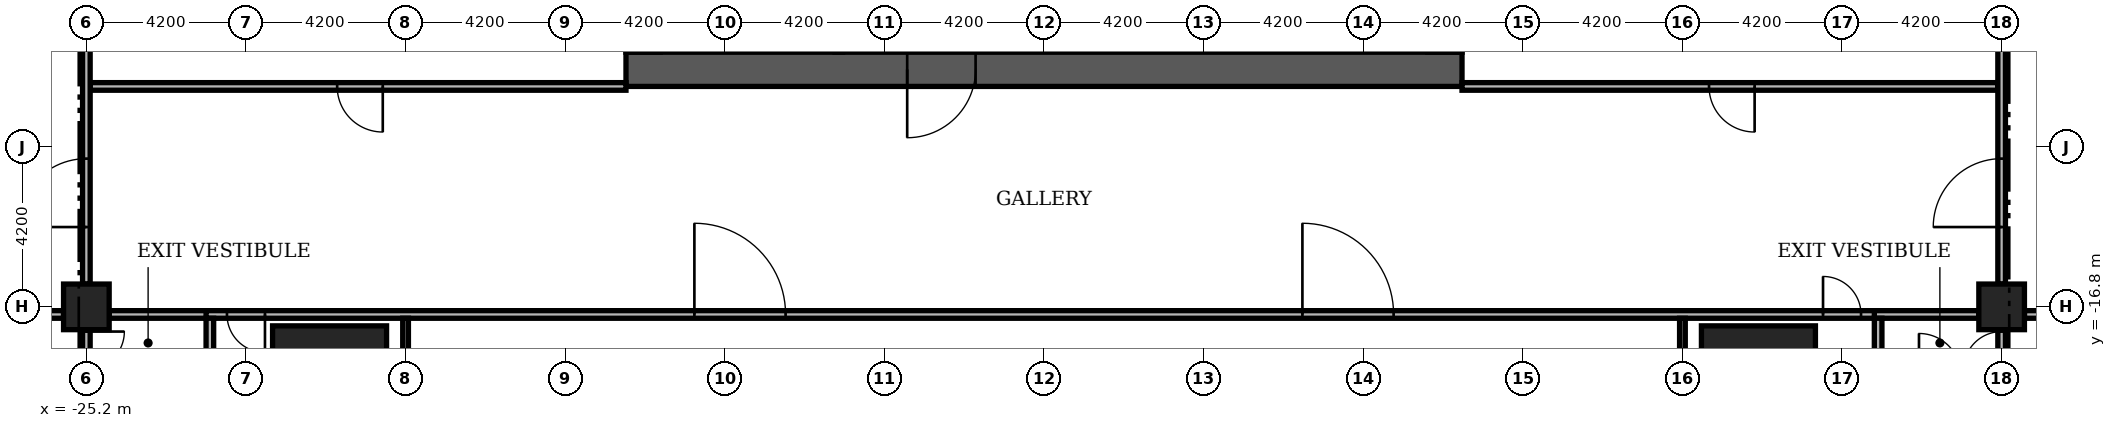
"""IFC4 building model, lengths in metres.
Left out: names, types, materials, properties, quantities, classifications, styles, units other than length and angle.
Written with IfcOpenShell. Run it as: python <this file> out.ifc"""

import sys

from ifc_helpers import new_model, si_unit, direction, frame, frame_2d, origin, origin_2d, place, context, subcontext, project, spatial, rectangle, extrude, element, fill, save


model = new_model("IFC4")
c1 = context("Model", 3, precision=1e-05, world=origin(), true_north=direction((0.0, 1.0)))
c2 = subcontext(c1, "Body", "Model", "MODEL_VIEW")
j1 = project(units=[si_unit("LENGTHUNIT", "METRE"), si_unit("PLANEANGLEUNIT", "RADIAN")], contexts=[c1])
p1 = place(None, origin())
s1 = spatial("IfcSite", under=j1, at=p1, CompositionType="ELEMENT")
p2 = place(p1, origin())
s2 = spatial("IfcBuilding", under=s1, at=p2, CompositionType="ELEMENT")
p3 = place(p2, origin())
s3 = spatial("IfcBuildingStorey", under=s2, at=p3, CompositionType="ELEMENT", Elevation=0.0)
p4 = place(p3, frame((-11.0, -10.55, 0.0), z_axis=(0.0, 0.0, 1.0), x_axis=(1.0, 0.0, 0.0)))
e1 = element("IfcWall", 1, at=p4, inside=s3, PredefinedType="SHEAR", context=c2, shape_type="SweptSolid", body=[
    extrude(rectangle(XDim=22.0, YDim=0.9, at=frame_2d((11.0, 0.0))), origin(), (0.0, 0.0, 1.0), 6.78),
])
p5 = place(p4, frame((7.4, 0.0, 0.0)))
e2 = element("IfcOpeningElement", 2, at=p5, cuts=e1, PredefinedType="OPENING", context=c2, shape_type="SweptSolid", body=[
    extrude(rectangle(XDim=1.8, YDim=2.2, at=frame_2d((0.9, 1.1))), frame((0.0, 0.46, 0.0), z_axis=(0.0, -1.0, 0.0), x_axis=(1.0, 0.0, 0.0)), (0.0, 0.0, 1.0), 0.92),
])
for number, where, z_axis, x_axis in (
    (3, (18.8, -18.8, 0.0), (0.0, 0.0, 1.0), (1.0, 0.0, 0.0)),
    (4, (-18.8, -18.8, 0.0), (0.0, 0.0, 1.0), (1.0, 0.0, 0.0)),
):
    element("IfcColumn", number, at=place(p3, frame(where, z_axis=z_axis, x_axis=x_axis)), inside=s3, PredefinedType="COLUMN", context=c2, shape_type="SweptSolid", body=[
        extrude(rectangle(XDim=3.0, YDim=3.0, at=origin_2d()), origin(), (0.0, 0.0, 1.0), 7.2),
    ])
for number, where, z_axis, x_axis in (
    (5, (25.2, -16.8, 0.0), (0.0, 0.0, 1.0), (1.0, 0.0, 0.0)),
    (6, (-25.2, -16.8, 0.0), (0.0, 0.0, 1.0), (1.0, 0.0, 0.0)),
):
    element("IfcColumn", number, at=place(p3, frame(where, z_axis=z_axis, x_axis=x_axis)), inside=s3, PredefinedType="COLUMN", context=c2, shape_type="SweptSolid", body=[
        extrude(rectangle(XDim=1.2, YDim=1.2, at=origin_2d()), origin(), (0.0, 0.0, 1.0), 7.2),
    ])
p6 = place(p3, frame((-33.0, -17.0, 0.0), z_axis=(0.0, 0.0, 1.0), x_axis=(1.0, 0.0, 0.0)))
e7 = element("IfcWall", 7, at=p6, inside=s3, PredefinedType="PARTITIONING", context=c2, shape_type="SweptSolid", body=[
    extrude(rectangle(XDim=7.2, YDim=0.2, at=frame_2d((3.6, 0.0))), origin(), (0.0, 0.0, 1.0), 6.48),
])
p7 = place(p3, frame((-24.6, -17.0, 0.0), z_axis=(0.0, 0.0, 1.0), x_axis=(1.0, 0.0, 0.0)))
e8 = element("IfcWall", 8, at=p7, inside=s3, PredefinedType="PARTITIONING", context=c2, shape_type="SweptSolid", body=[
    extrude(rectangle(XDim=2.75, YDim=0.2, at=frame_2d((1.375, 0.0))), origin(), (0.0, 0.0, 1.0), 6.78),
])
p8 = place(p3, frame((-22.05, -17.0, 0.0), z_axis=(0.0, 0.0, 1.0), x_axis=(1.0, 0.0, 0.0)))
e9 = element("IfcWall", 9, at=p8, inside=s3, PredefinedType="PARTITIONING", context=c2, shape_type="SweptSolid", body=[
    extrude(rectangle(XDim=44.1, YDim=0.2, at=frame_2d((22.05, 0.0))), origin(), (0.0, 0.0, 1.0), 6.78),
])
p9 = place(p8, frame((0.55, 0.0, 0.0)))
e10 = element("IfcOpeningElement", 10, at=p9, cuts=e9, PredefinedType="OPENING", context=c2, shape_type="SweptSolid", body=[
    extrude(rectangle(XDim=1.0, YDim=2.1, at=frame_2d((0.5, 1.05))), frame((0.0, 0.11, 0.0), z_axis=(0.0, -1.0, 0.0), x_axis=(1.0, 0.0, 0.0)), (0.0, 0.0, 1.0), 0.22),
])
p10 = place(p8, frame((12.85, 0.0, 0.0)))
e11 = element("IfcOpeningElement", 11, at=p10, cuts=e9, PredefinedType="OPENING", context=c2, shape_type="SweptSolid", body=[
    extrude(rectangle(XDim=2.4, YDim=2.4, at=frame_2d((1.2, 1.2))), frame((0.0, 0.11, 0.0), z_axis=(0.0, -1.0, 0.0), x_axis=(1.0, 0.0, 0.0)), (0.0, 0.0, 1.0), 0.22),
])
p11 = place(p8, frame((28.85, 0.0, 0.0)))
e12 = element("IfcOpeningElement", 12, at=p11, cuts=e9, PredefinedType="OPENING", context=c2, shape_type="SweptSolid", body=[
    extrude(rectangle(XDim=2.4, YDim=2.4, at=frame_2d((1.2, 1.2))), frame((0.0, 0.11, 0.0), z_axis=(0.0, -1.0, 0.0), x_axis=(1.0, 0.0, 0.0)), (0.0, 0.0, 1.0), 0.22),
])
p12 = place(p8, frame((42.55, 0.0, 0.0)))
e13 = element("IfcOpeningElement", 13, at=p12, cuts=e9, PredefinedType="OPENING", context=c2, shape_type="SweptSolid", body=[
    extrude(rectangle(XDim=1.0, YDim=2.1, at=frame_2d((0.5, 1.05))), frame((0.0, 0.11, 0.0), z_axis=(0.0, -1.0, 0.0), x_axis=(1.0, 0.0, 0.0)), (0.0, 0.0, 1.0), 0.22),
])
p13 = place(p3, frame((21.85, -17.0, 0.0), z_axis=(0.0, 0.0, 1.0), x_axis=(1.0, 0.0, 0.0)))
e14 = element("IfcWall", 14, at=p13, inside=s3, PredefinedType="PARTITIONING", context=c2, shape_type="SweptSolid", body=[
    extrude(rectangle(XDim=2.75, YDim=0.2, at=frame_2d((1.375, 0.0))), origin(), (0.0, 0.0, 1.0), 6.78),
])
p14 = place(p3, frame((25.8, -17.0, 0.0), z_axis=(0.0, 0.0, 1.0), x_axis=(1.0, 0.0, 0.0)))
e15 = element("IfcWall", 15, at=p14, inside=s3, PredefinedType="PARTITIONING", context=c2, shape_type="SweptSolid", body=[
    extrude(rectangle(XDim=7.2, YDim=0.2, at=frame_2d((3.6, 0.0))), origin(), (0.0, 0.0, 1.0), 6.48),
])
p15 = place(p3, frame((-25.1, -11.0, 0.0), z_axis=(0.0, 0.0, 1.0), x_axis=(1.0, 0.0, 0.0)))
e16 = element("IfcWall", 16, at=p15, inside=s3, PredefinedType="PARTITIONING", context=c2, shape_type="SweptSolid", body=[
    extrude(rectangle(XDim=14.1, YDim=0.2, at=frame_2d((7.05, 0.0))), origin(), (0.0, 0.0, 1.0), 6.78),
])
p16 = place(p15, frame((6.5, 0.0, 0.0)))
e17 = element("IfcOpeningElement", 17, at=p16, cuts=e16, PredefinedType="OPENING", context=c2, shape_type="SweptSolid", body=[
    extrude(rectangle(XDim=1.2, YDim=2.2, at=frame_2d((0.6, 1.1))), frame((0.0, 0.11, 0.0), z_axis=(0.0, -1.0, 0.0), x_axis=(1.0, 0.0, 0.0)), (0.0, 0.0, 1.0), 0.22),
])
p17 = place(p3, frame((11.0, -11.0, 0.0), z_axis=(0.0, 0.0, 1.0), x_axis=(1.0, 0.0, 0.0)))
e18 = element("IfcWall", 18, at=p17, inside=s3, PredefinedType="PARTITIONING", context=c2, shape_type="SweptSolid", body=[
    extrude(rectangle(XDim=14.1, YDim=0.2, at=frame_2d((7.05, 0.0))), origin(), (0.0, 0.0, 1.0), 6.78),
])
p18 = place(p17, frame((6.5, 0.0, 0.0)))
e19 = element("IfcOpeningElement", 19, at=p18, cuts=e18, PredefinedType="OPENING", context=c2, shape_type="SweptSolid", body=[
    extrude(rectangle(XDim=1.2, YDim=2.2, at=frame_2d((0.6, 1.1))), frame((0.0, 0.11, 0.0), z_axis=(0.0, -1.0, 0.0), x_axis=(1.0, 0.0, 0.0)), (0.0, 0.0, 1.0), 0.22),
])
p19 = place(p3, frame((-25.2, -18.5, 0.0), z_axis=(0.0, 0.0, 1.0), x_axis=(0.0, 1.0, 0.0)))
e20 = element("IfcWall", 20, at=p19, inside=s3, PredefinedType="PARTITIONING", context=c2, shape_type="SweptSolid", body=[
    extrude(rectangle(XDim=1.1, YDim=0.2, at=frame_2d((0.55, 0.0))), origin(), (0.0, 0.0, 1.0), 6.38),
])
p20 = place(p19, frame((0.05, 0.0, 0.0)))
e21 = element("IfcOpeningElement", 21, at=p20, cuts=e20, PredefinedType="OPENING", context=c2, shape_type="SweptSolid", body=[
    extrude(rectangle(XDim=1.0, YDim=2.2, at=frame_2d((0.5, 1.1))), frame((0.0, 0.11, 0.0), z_axis=(0.0, -1.0, 0.0), x_axis=(1.0, 0.0, 0.0)), (0.0, 0.0, 1.0), 0.22),
])
p21 = place(p3, frame((-25.2, -16.2, 0.0), z_axis=(0.0, 0.0, 1.0), x_axis=(0.0, 1.0, 0.0)))
e22 = element("IfcWall", 22, at=p21, inside=s3, PredefinedType="PARTITIONING", context=c2, shape_type="SweptSolid", body=[
    extrude(rectangle(XDim=7.2, YDim=0.2, at=frame_2d((3.6, 0.0))), origin(), (0.0, 0.0, 1.0), 6.48),
])
p22 = place(p21, frame((1.5, 0.0, 0.0)))
e23 = element("IfcOpeningElement", 23, at=p22, cuts=e22, PredefinedType="OPENING", context=c2, shape_type="SweptSolid", body=[
    extrude(rectangle(XDim=1.8, YDim=2.2, at=frame_2d((0.9, 1.1))), frame((0.0, 0.11, 0.0), z_axis=(0.0, -1.0, 0.0), x_axis=(1.0, 0.0, 0.0)), (0.0, 0.0, 1.0), 0.22),
])
p23 = place(p3, frame((-21.95, -18.5, 0.0), z_axis=(0.0, 0.0, 1.0), x_axis=(0.0, 1.0, 0.0)))
e24 = element("IfcWall", 24, at=p23, inside=s3, PredefinedType="PARTITIONING", context=c2, shape_type="SweptSolid", body=[
    extrude(rectangle(XDim=1.4, YDim=0.2, at=frame_2d((0.7, 0.0))), origin(), (0.0, 0.0, 1.0), 6.78),
])
for number, where, z_axis, x_axis in (
    (25, (-16.8, -24.6, 0.0), (0.0, 0.0, 1.0), (0.0, 1.0, 0.0)),
    (26, (16.8, -24.6, 0.0), (0.0, 0.0, 1.0), (0.0, 1.0, 0.0)),
):
    element("IfcWall", number, at=place(p3, frame(where, z_axis=z_axis, x_axis=x_axis)), inside=s3, PredefinedType="PARTITIONING", context=c2, shape_type="SweptSolid", body=[
        extrude(rectangle(XDim=7.5, YDim=0.15, at=frame_2d((3.75, 0.0))), origin(), (0.0, 0.0, 1.0), 6.78),
    ])
p24 = place(p3, frame((21.95, -18.5, 0.0), z_axis=(0.0, 0.0, 1.0), x_axis=(0.0, 1.0, 0.0)))
e27 = element("IfcWall", 27, at=p24, inside=s3, PredefinedType="PARTITIONING", context=c2, shape_type="SweptSolid", body=[
    extrude(rectangle(XDim=1.4, YDim=0.2, at=frame_2d((0.7, 0.0))), origin(), (0.0, 0.0, 1.0), 6.78),
])
p25 = place(p3, frame((25.2, -18.5, 0.0), z_axis=(0.0, 0.0, 1.0), x_axis=(0.0, 1.0, 0.0)))
e28 = element("IfcWall", 28, at=p25, inside=s3, PredefinedType="PARTITIONING", context=c2, shape_type="SweptSolid", body=[
    extrude(rectangle(XDim=1.1, YDim=0.2, at=frame_2d((0.55, 0.0))), origin(), (0.0, 0.0, 1.0), 6.38),
])
p26 = place(p25, frame((0.05, 0.0, 0.0)))
e29 = element("IfcOpeningElement", 29, at=p26, cuts=e28, PredefinedType="OPENING", context=c2, shape_type="SweptSolid", body=[
    extrude(rectangle(XDim=1.0, YDim=2.2, at=frame_2d((0.5, 1.1))), frame((0.0, 0.11, 0.0), z_axis=(0.0, -1.0, 0.0), x_axis=(1.0, 0.0, 0.0)), (0.0, 0.0, 1.0), 0.22),
])
p27 = place(p3, frame((25.2, -16.2, 0.0), z_axis=(0.0, 0.0, 1.0), x_axis=(0.0, 1.0, 0.0)))
e30 = element("IfcWall", 30, at=p27, inside=s3, PredefinedType="PARTITIONING", context=c2, shape_type="SweptSolid", body=[
    extrude(rectangle(XDim=7.2, YDim=0.2, at=frame_2d((3.6, 0.0))), origin(), (0.0, 0.0, 1.0), 6.48),
])
p28 = place(p27, frame((1.5, 0.0, 0.0)))
e31 = element("IfcOpeningElement", 31, at=p28, cuts=e30, PredefinedType="OPENING", context=c2, shape_type="SweptSolid", body=[
    extrude(rectangle(XDim=1.8, YDim=2.2, at=frame_2d((0.9, 1.1))), frame((0.0, 0.11, 0.0), z_axis=(0.0, -1.0, 0.0), x_axis=(1.0, 0.0, 0.0)), (0.0, 0.0, 1.0), 0.22),
])
p29 = place(p5, frame((1.8, 0.0, 0.0), z_axis=(0.0, 0.0, 1.0), x_axis=(-1.0, 0.0, 0.0)))
e32 = element("IfcDoor", 32, at=p29, inside=s3, OperationType="DOUBLE_DOOR_SINGLE_SWING", PredefinedType="DOOR", context=c2, shape_type="SweptSolid", body=[
    extrude(rectangle(XDim=1.8, YDim=2.2, at=frame_2d((0.9, 1.1))), frame((0.0, 0.025, 0.0), z_axis=(0.0, -1.0, 0.0), x_axis=(1.0, 0.0, 0.0)), (0.0, 0.0, 1.0), 0.05),
])
fill(e2, e32)
p30 = place(p20, origin())
e33 = element("IfcDoor", 33, at=p30, inside=s3, OperationType="SINGLE_SWING_RIGHT", PredefinedType="DOOR", context=c2, shape_type="SweptSolid", body=[
    extrude(rectangle(XDim=1.0, YDim=2.2, at=frame_2d((0.5, 1.1))), frame((0.0, 0.025, 0.0), z_axis=(0.0, -1.0, 0.0), x_axis=(1.0, 0.0, 0.0)), (0.0, 0.0, 1.0), 0.05),
])
fill(e21, e33)
p31 = place(p26, origin())
e34 = element("IfcDoor", 34, at=p31, inside=s3, OperationType="SINGLE_SWING_LEFT", PredefinedType="DOOR", context=c2, shape_type="SweptSolid", body=[
    extrude(rectangle(XDim=1.0, YDim=2.2, at=frame_2d((0.5, 1.1))), frame((0.0, 0.025, 0.0), z_axis=(0.0, -1.0, 0.0), x_axis=(1.0, 0.0, 0.0)), (0.0, 0.0, 1.0), 0.05),
])
fill(e29, e34)
p32 = place(p9, origin())
e35 = element("IfcDoor", 35, at=p32, inside=s3, OperationType="SINGLE_SWING_RIGHT", PredefinedType="DOOR", context=c2, shape_type="SweptSolid", body=[
    extrude(rectangle(XDim=1.0, YDim=2.1, at=frame_2d((0.5, 1.05))), frame((0.0, 0.025, 0.0), z_axis=(0.0, -1.0, 0.0), x_axis=(1.0, 0.0, 0.0)), (0.0, 0.0, 1.0), 0.05),
])
fill(e10, e35)
p33 = place(p10, origin())
e36 = element("IfcDoor", 36, at=p33, inside=s3, OperationType="DOUBLE_DOOR_SINGLE_SWING", PredefinedType="DOOR", context=c2, shape_type="SweptSolid", body=[
    extrude(rectangle(XDim=2.4, YDim=2.4, at=frame_2d((1.2, 1.2))), frame((0.0, 0.025, 0.0), z_axis=(0.0, -1.0, 0.0), x_axis=(1.0, 0.0, 0.0)), (0.0, 0.0, 1.0), 0.05),
])
fill(e11, e36)
p34 = place(p11, origin())
e37 = element("IfcDoor", 37, at=p34, inside=s3, OperationType="DOUBLE_DOOR_SINGLE_SWING", PredefinedType="DOOR", context=c2, shape_type="SweptSolid", body=[
    extrude(rectangle(XDim=2.4, YDim=2.4, at=frame_2d((1.2, 1.2))), frame((0.0, 0.025, 0.0), z_axis=(0.0, -1.0, 0.0), x_axis=(1.0, 0.0, 0.0)), (0.0, 0.0, 1.0), 0.05),
])
fill(e12, e37)
p35 = place(p12, origin())
e38 = element("IfcDoor", 38, at=p35, inside=s3, OperationType="SINGLE_SWING_LEFT", PredefinedType="DOOR", context=c2, shape_type="SweptSolid", body=[
    extrude(rectangle(XDim=1.0, YDim=2.1, at=frame_2d((0.5, 1.05))), frame((0.0, 0.025, 0.0), z_axis=(0.0, -1.0, 0.0), x_axis=(1.0, 0.0, 0.0)), (0.0, 0.0, 1.0), 0.05),
])
fill(e13, e38)
p36 = place(p22, origin())
e39 = element("IfcDoor", 39, at=p36, inside=s3, OperationType="DOUBLE_DOOR_SINGLE_SWING", PredefinedType="DOOR", context=c2, shape_type="SweptSolid", body=[
    extrude(rectangle(XDim=1.8, YDim=2.2, at=frame_2d((0.9, 1.1))), frame((0.0, 0.025, 0.0), z_axis=(0.0, -1.0, 0.0), x_axis=(1.0, 0.0, 0.0)), (0.0, 0.0, 1.0), 0.05),
])
fill(e23, e39)
p37 = place(p28, origin())
e40 = element("IfcDoor", 40, at=p37, inside=s3, OperationType="DOUBLE_DOOR_SINGLE_SWING", PredefinedType="DOOR", context=c2, shape_type="SweptSolid", body=[
    extrude(rectangle(XDim=1.8, YDim=2.2, at=frame_2d((0.9, 1.1))), frame((0.0, 0.025, 0.0), z_axis=(0.0, -1.0, 0.0), x_axis=(1.0, 0.0, 0.0)), (0.0, 0.0, 1.0), 0.05),
])
fill(e31, e40)
p38 = place(p16, origin())
e41 = element("IfcDoor", 41, at=p38, inside=s3, OperationType="SINGLE_SWING_RIGHT", PredefinedType="DOOR", context=c2, shape_type="SweptSolid", body=[
    extrude(rectangle(XDim=1.2, YDim=2.2, at=frame_2d((0.6, 1.1))), frame((0.0, 0.025, 0.0), z_axis=(0.0, -1.0, 0.0), x_axis=(1.0, 0.0, 0.0)), (0.0, 0.0, 1.0), 0.05),
])
fill(e17, e41)
p39 = place(p18, origin())
e42 = element("IfcDoor", 42, at=p39, inside=s3, OperationType="SINGLE_SWING_RIGHT", PredefinedType="DOOR", context=c2, shape_type="SweptSolid", body=[
    extrude(rectangle(XDim=1.2, YDim=2.2, at=frame_2d((0.6, 1.1))), frame((0.0, 0.025, 0.0), z_axis=(0.0, -1.0, 0.0), x_axis=(1.0, 0.0, 0.0)), (0.0, 0.0, 1.0), 0.05),
])
fill(e19, e42)
save(model, sys.argv[1])
